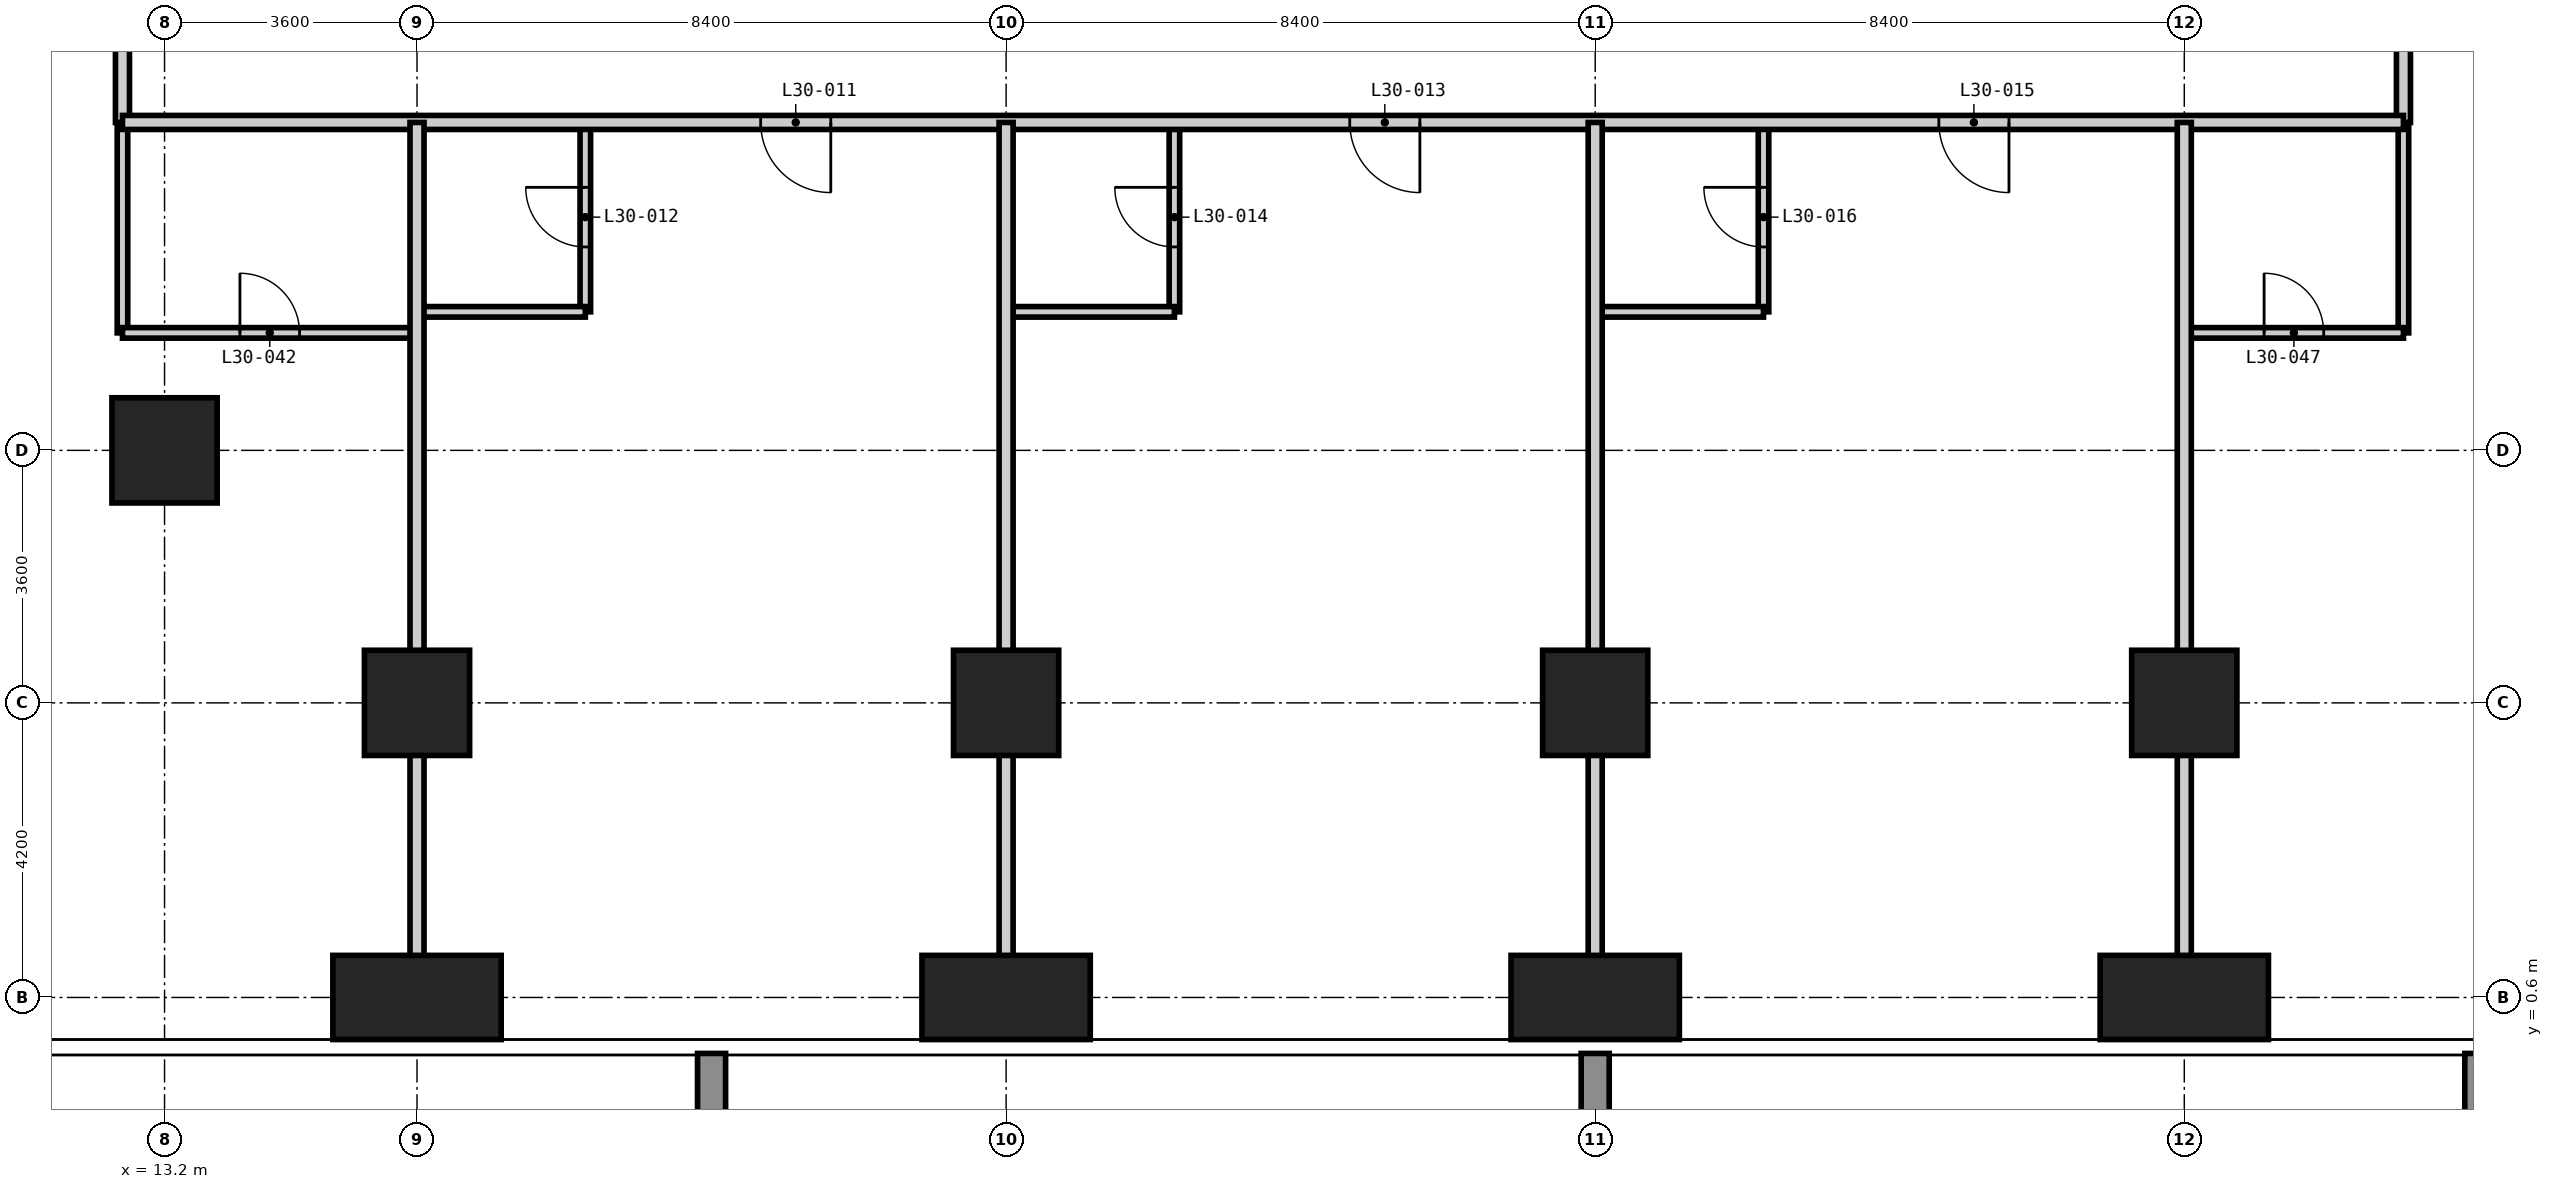
"""IFC4 building model, lengths in metres.
Left out: names, types, materials, properties, quantities, classifications, styles, units other than length and angle.
Written with IfcOpenShell. Run it as: python <this file> out.ifc"""

import sys

from ifc_helpers import new_model, si_unit, direction, frame, frame_2d, origin, origin_2d, place, context, subcontext, project, spatial, rectangle, extrude, element, fill, save


model = new_model("IFC4")
c1 = context("Model", 3, precision=1e-05, world=origin(), true_north=direction((0.0, 1.0)))
c2 = subcontext(c1, "Body", "Model", "MODEL_VIEW")
j1 = project(units=[si_unit("LENGTHUNIT", "METRE"), si_unit("PLANEANGLEUNIT", "RADIAN")], contexts=[c1])
p1 = place(None, origin())
s1 = spatial("IfcSite", under=j1, at=p1, CompositionType="ELEMENT")
p2 = place(p1, origin())
s2 = spatial("IfcBuilding", under=s1, at=p2, CompositionType="ELEMENT")
p3 = place(p2, frame((0.0, 0.0, 118.8)))
s3 = spatial("IfcBuildingStorey", under=s2, at=p3, CompositionType="ELEMENT", Elevation=118.8)
p4 = place(p3, frame((13.2, 8.4, -0.35), z_axis=(0.0, 0.0, 1.0), x_axis=(1.0, 0.0, 0.0)))
e1 = element("IfcColumn", 1, at=p4, inside=s3, PredefinedType="COLUMN", context=c2, shape_type="SweptSolid", body=[
    extrude(rectangle(XDim=1.5, YDim=1.5, at=origin_2d()), origin(), (0.0, 0.0, 1.0), 3.6),
])
p5 = place(p3, frame((16.8, 0.6, -0.35), z_axis=(0.0, 0.0, 1.0), x_axis=(1.0, 0.0, 0.0)))
e2 = element("IfcColumn", 2, at=p5, inside=s3, PredefinedType="COLUMN", context=c2, shape_type="SweptSolid", body=[
    extrude(rectangle(XDim=2.4, YDim=1.2, at=origin_2d()), origin(), (0.0, 0.0, 1.0), 3.6),
])
p6 = place(p3, frame((16.8, 4.8, -0.35), z_axis=(0.0, 0.0, 1.0), x_axis=(1.0, 0.0, 0.0)))
e3 = element("IfcColumn", 3, at=p6, inside=s3, PredefinedType="COLUMN", context=c2, shape_type="SweptSolid", body=[
    extrude(rectangle(XDim=1.5, YDim=1.5, at=origin_2d()), origin(), (0.0, 0.0, 1.0), 3.6),
])
p7 = place(p3, frame((25.2, 0.6, -0.35), z_axis=(0.0, 0.0, 1.0), x_axis=(1.0, 0.0, 0.0)))
e4 = element("IfcColumn", 4, at=p7, inside=s3, PredefinedType="COLUMN", context=c2, shape_type="SweptSolid", body=[
    extrude(rectangle(XDim=2.4, YDim=1.2, at=origin_2d()), origin(), (0.0, 0.0, 1.0), 3.6),
])
p8 = place(p3, frame((25.2, 4.8, -0.35), z_axis=(0.0, 0.0, 1.0), x_axis=(1.0, 0.0, 0.0)))
e5 = element("IfcColumn", 5, at=p8, inside=s3, PredefinedType="COLUMN", context=c2, shape_type="SweptSolid", body=[
    extrude(rectangle(XDim=1.5, YDim=1.5, at=origin_2d()), origin(), (0.0, 0.0, 1.0), 3.6),
])
p9 = place(p3, frame((33.6, 0.6, -0.35), z_axis=(0.0, 0.0, 1.0), x_axis=(1.0, 0.0, 0.0)))
e6 = element("IfcColumn", 6, at=p9, inside=s3, PredefinedType="COLUMN", context=c2, shape_type="SweptSolid", body=[
    extrude(rectangle(XDim=2.4, YDim=1.2, at=origin_2d()), origin(), (0.0, 0.0, 1.0), 3.6),
])
p10 = place(p3, frame((33.6, 4.8, -0.35), z_axis=(0.0, 0.0, 1.0), x_axis=(1.0, 0.0, 0.0)))
e7 = element("IfcColumn", 7, at=p10, inside=s3, PredefinedType="COLUMN", context=c2, shape_type="SweptSolid", body=[
    extrude(rectangle(XDim=1.5, YDim=1.5, at=origin_2d()), origin(), (0.0, 0.0, 1.0), 3.6),
])
p11 = place(p3, frame((42.0, 0.6, -0.35), z_axis=(0.0, 0.0, 1.0), x_axis=(1.0, 0.0, 0.0)))
e8 = element("IfcColumn", 8, at=p11, inside=s3, PredefinedType="COLUMN", context=c2, shape_type="SweptSolid", body=[
    extrude(rectangle(XDim=2.4, YDim=1.2, at=origin_2d()), origin(), (0.0, 0.0, 1.0), 3.6),
])
p12 = place(p3, frame((42.0, 4.8, -0.35), z_axis=(0.0, 0.0, 1.0), x_axis=(1.0, 0.0, 0.0)))
e9 = element("IfcColumn", 9, at=p12, inside=s3, PredefinedType="COLUMN", context=c2, shape_type="SweptSolid", body=[
    extrude(rectangle(XDim=1.5, YDim=1.5, at=origin_2d()), origin(), (0.0, 0.0, 1.0), 3.6),
])
p13 = place(p3, frame((12.6, 10.075, 0.0), z_axis=(0.0, 0.0, 1.0), x_axis=(0.0, 1.0, 0.0)))
e10 = element("IfcWall", 10, at=p13, inside=s3, PredefinedType="PARTITIONING", context=c2, shape_type="SweptSolid", body=[
    extrude(rectangle(XDim=3.0, YDim=0.15, at=frame_2d((1.5, 0.0))), origin(), (0.0, 0.0, 1.0), 3.25),
])
p14 = place(p3, frame((19.2, 10.375, 0.0), z_axis=(0.0, 0.0, 1.0), x_axis=(0.0, 1.0, 0.0)))
e11 = element("IfcWall", 11, at=p14, inside=s3, PredefinedType="PARTITIONING", context=c2, shape_type="SweptSolid", body=[
    extrude(rectangle(XDim=2.7, YDim=0.15, at=frame_2d((1.35, 0.0))), origin(), (0.0, 0.0, 1.0), 3.25),
])
p15 = place(p14, frame((0.925, 0.0, 0.0)))
e12 = element("IfcOpeningElement", 12, at=p15, cuts=e11, PredefinedType="OPENING", context=c2, shape_type="SweptSolid", body=[
    extrude(rectangle(XDim=0.85, YDim=2.1, at=frame_2d((0.425, 1.05))), frame((0.0, 0.085, 0.0), z_axis=(0.0, -1.0, 0.0), x_axis=(1.0, 0.0, 0.0)), (0.0, 0.0, 1.0), 0.17),
])
p16 = place(p3, frame((27.6, 10.375, 0.0), z_axis=(0.0, 0.0, 1.0), x_axis=(0.0, 1.0, 0.0)))
e13 = element("IfcWall", 13, at=p16, inside=s3, PredefinedType="PARTITIONING", context=c2, shape_type="SweptSolid", body=[
    extrude(rectangle(XDim=2.7, YDim=0.15, at=frame_2d((1.35, 0.0))), origin(), (0.0, 0.0, 1.0), 3.25),
])
p17 = place(p16, frame((0.925, 0.0, 0.0)))
e14 = element("IfcOpeningElement", 14, at=p17, cuts=e13, PredefinedType="OPENING", context=c2, shape_type="SweptSolid", body=[
    extrude(rectangle(XDim=0.85, YDim=2.1, at=frame_2d((0.425, 1.05))), frame((0.0, 0.085, 0.0), z_axis=(0.0, -1.0, 0.0), x_axis=(1.0, 0.0, 0.0)), (0.0, 0.0, 1.0), 0.17),
])
p18 = place(p3, frame((36.0, 10.375, 0.0), z_axis=(0.0, 0.0, 1.0), x_axis=(0.0, 1.0, 0.0)))
e15 = element("IfcWall", 15, at=p18, inside=s3, PredefinedType="PARTITIONING", context=c2, shape_type="SweptSolid", body=[
    extrude(rectangle(XDim=2.7, YDim=0.15, at=frame_2d((1.35, 0.0))), origin(), (0.0, 0.0, 1.0), 3.25),
])
p19 = place(p18, frame((0.925, 0.0, 0.0)))
e16 = element("IfcOpeningElement", 16, at=p19, cuts=e15, PredefinedType="OPENING", context=c2, shape_type="SweptSolid", body=[
    extrude(rectangle(XDim=0.85, YDim=2.1, at=frame_2d((0.425, 1.05))), frame((0.0, 0.085, 0.0), z_axis=(0.0, -1.0, 0.0), x_axis=(1.0, 0.0, 0.0)), (0.0, 0.0, 1.0), 0.17),
])
p20 = place(p3, frame((45.125, 10.075, 0.0), z_axis=(0.0, 0.0, 1.0), x_axis=(0.0, 1.0, 0.0)))
e17 = element("IfcWall", 17, at=p20, inside=s3, PredefinedType="PARTITIONING", context=c2, shape_type="SweptSolid", body=[
    extrude(rectangle(XDim=3.0, YDim=0.15, at=frame_2d((1.5, 0.0))), origin(), (0.0, 0.0, 1.0), 3.25),
])
p21 = place(p3, frame((12.6, 10.075, 0.0), z_axis=(0.0, 0.0, 1.0), x_axis=(1.0, 0.0, 0.0)))
e18 = element("IfcWall", 18, at=p21, inside=s3, PredefinedType="PARTITIONING", context=c2, shape_type="SweptSolid", body=[
    extrude(rectangle(XDim=4.2, YDim=0.15, at=frame_2d((2.1, 0.0))), origin(), (0.0, 0.0, 1.0), 3.25),
])
p22 = place(p21, frame((1.675, 0.0, 0.0)))
e19 = element("IfcOpeningElement", 19, at=p22, cuts=e18, PredefinedType="OPENING", context=c2, shape_type="SweptSolid", body=[
    extrude(rectangle(XDim=0.85, YDim=2.1, at=frame_2d((0.425, 1.05))), frame((0.0, 0.085, 0.0), z_axis=(0.0, -1.0, 0.0), x_axis=(1.0, 0.0, 0.0)), (0.0, 0.0, 1.0), 0.17),
])
p23 = place(p3, frame((42.0, 10.075, 0.0), z_axis=(0.0, 0.0, 1.0), x_axis=(1.0, 0.0, 0.0)))
e20 = element("IfcWall", 20, at=p23, inside=s3, PredefinedType="PARTITIONING", context=c2, shape_type="SweptSolid", body=[
    extrude(rectangle(XDim=3.125, YDim=0.15, at=frame_2d((1.562, 0.0))), origin(), (0.0, 0.0, 1.0), 3.25),
])
p24 = place(p23, frame((1.138, 0.0, 0.0)))
e21 = element("IfcOpeningElement", 21, at=p24, cuts=e20, PredefinedType="OPENING", context=c2, shape_type="SweptSolid", body=[
    extrude(rectangle(XDim=0.85, YDim=2.1, at=frame_2d((0.425, 1.05))), frame((0.0, 0.085, 0.0), z_axis=(0.0, -1.0, 0.0), x_axis=(1.0, 0.0, 0.0)), (0.0, 0.0, 1.0), 0.17),
])
p25 = place(p3, frame((16.8, 10.375, 0.0), z_axis=(0.0, 0.0, 1.0), x_axis=(1.0, 0.0, 0.0)))
e22 = element("IfcWall", 22, at=p25, inside=s3, PredefinedType="PARTITIONING", context=c2, shape_type="SweptSolid", body=[
    extrude(rectangle(XDim=2.4, YDim=0.15, at=frame_2d((1.2, 0.0))), origin(), (0.0, 0.0, 1.0), 3.25),
])
p26 = place(p3, frame((25.2, 10.375, 0.0), z_axis=(0.0, 0.0, 1.0), x_axis=(1.0, 0.0, 0.0)))
e23 = element("IfcWall", 23, at=p26, inside=s3, PredefinedType="PARTITIONING", context=c2, shape_type="SweptSolid", body=[
    extrude(rectangle(XDim=2.4, YDim=0.15, at=frame_2d((1.2, 0.0))), origin(), (0.0, 0.0, 1.0), 3.25),
])
p27 = place(p3, frame((33.6, 10.375, 0.0), z_axis=(0.0, 0.0, 1.0), x_axis=(1.0, 0.0, 0.0)))
e24 = element("IfcWall", 24, at=p27, inside=s3, PredefinedType="PARTITIONING", context=c2, shape_type="SweptSolid", body=[
    extrude(rectangle(XDim=2.4, YDim=0.15, at=frame_2d((1.2, 0.0))), origin(), (0.0, 0.0, 1.0), 3.25),
])
p28 = place(p3, frame((12.6, 13.075, 0.0), z_axis=(0.0, 0.0, 1.0), x_axis=(0.0, 1.0, 0.0)))
e25 = element("IfcWall", 25, at=p28, inside=s3, PredefinedType="PARTITIONING", context=c2, shape_type="SweptSolid", body=[
    extrude(rectangle(XDim=31.45, YDim=0.2, at=frame_2d((15.725, 0.0))), origin(), (0.0, 0.0, 1.0), 3.25),
])
p29 = place(p28, frame((8.625, 0.0, 0.0)))
e26 = element("IfcOpeningElement", 26, at=p29, cuts=e25, PredefinedType="OPENING", context=c2, shape_type="SweptSolid", body=[
    extrude(rectangle(XDim=1.0, YDim=2.2, at=frame_2d((0.5, 1.1))), frame((0.0, 0.11, 0.0), z_axis=(0.0, -1.0, 0.0), x_axis=(1.0, 0.0, 0.0)), (0.0, 0.0, 1.0), 0.22),
])
p30 = place(p28, frame((17.025, 0.0, 0.0)))
e27 = element("IfcOpeningElement", 27, at=p30, cuts=e25, PredefinedType="OPENING", context=c2, shape_type="SweptSolid", body=[
    extrude(rectangle(XDim=1.0, YDim=2.2, at=frame_2d((0.5, 1.1))), frame((0.0, 0.11, 0.0), z_axis=(0.0, -1.0, 0.0), x_axis=(1.0, 0.0, 0.0)), (0.0, 0.0, 1.0), 0.22),
])
p31 = place(p28, frame((25.425, 0.0, 0.0)))
e28 = element("IfcOpeningElement", 28, at=p31, cuts=e25, PredefinedType="OPENING", context=c2, shape_type="SweptSolid", body=[
    extrude(rectangle(XDim=1.0, YDim=2.2, at=frame_2d((0.5, 1.1))), frame((0.0, 0.11, 0.0), z_axis=(0.0, -1.0, 0.0), x_axis=(1.0, 0.0, 0.0)), (0.0, 0.0, 1.0), 0.22),
])
p32 = place(p28, frame((1.363, 0.0, 0.0)))
e29 = element("IfcOpeningElement", 29, at=p32, cuts=e25, PredefinedType="OPENING", context=c2, shape_type="SweptSolid", body=[
    extrude(rectangle(XDim=1.0, YDim=2.2, at=frame_2d((0.5, 1.1))), frame((0.0, 0.11, 0.0), z_axis=(0.0, -1.0, 0.0), x_axis=(1.0, 0.0, 0.0)), (0.0, 0.0, 1.0), 0.22),
])
p33 = place(p28, frame((29.788, 0.0, 0.0)))
e30 = element("IfcOpeningElement", 30, at=p33, cuts=e25, PredefinedType="OPENING", context=c2, shape_type="SweptSolid", body=[
    extrude(rectangle(XDim=1.0, YDim=2.2, at=frame_2d((0.5, 1.1))), frame((0.0, 0.11, 0.0), z_axis=(0.0, -1.0, 0.0), x_axis=(1.0, 0.0, 0.0)), (0.0, 0.0, 1.0), 0.22),
])
p34 = place(p3, frame((45.125, 44.525, 0.0), z_axis=(0.0, 0.0, 1.0), x_axis=(0.0, -1.0, 0.0)))
e31 = element("IfcWall", 31, at=p34, inside=s3, PredefinedType="PARTITIONING", context=c2, shape_type="SweptSolid", body=[
    extrude(rectangle(XDim=31.45, YDim=0.2, at=frame_2d((15.725, 0.0))), origin(), (0.0, 0.0, 1.0), 3.25),
])
p35 = place(p34, frame((24.225, 0.0, 0.0)))
e32 = element("IfcOpeningElement", 32, at=p35, cuts=e31, PredefinedType="OPENING", context=c2, shape_type="SweptSolid", body=[
    extrude(rectangle(XDim=1.0, YDim=2.2, at=frame_2d((0.5, 1.1))), frame((0.0, 0.11, 0.0), z_axis=(0.0, -1.0, 0.0), x_axis=(1.0, 0.0, 0.0)), (0.0, 0.0, 1.0), 0.22),
])
p36 = place(p34, frame((15.825, 0.0, 0.0)))
e33 = element("IfcOpeningElement", 33, at=p36, cuts=e31, PredefinedType="OPENING", context=c2, shape_type="SweptSolid", body=[
    extrude(rectangle(XDim=1.0, YDim=2.2, at=frame_2d((0.5, 1.1))), frame((0.0, 0.11, 0.0), z_axis=(0.0, -1.0, 0.0), x_axis=(1.0, 0.0, 0.0)), (0.0, 0.0, 1.0), 0.22),
])
p37 = place(p34, frame((7.425, 0.0, 0.0)))
e34 = element("IfcOpeningElement", 34, at=p37, cuts=e31, PredefinedType="OPENING", context=c2, shape_type="SweptSolid", body=[
    extrude(rectangle(XDim=1.0, YDim=2.2, at=frame_2d((0.5, 1.1))), frame((0.0, 0.11, 0.0), z_axis=(0.0, -1.0, 0.0), x_axis=(1.0, 0.0, 0.0)), (0.0, 0.0, 1.0), 0.22),
])
p38 = place(p34, frame((29.087, 0.0, 0.0)))
e35 = element("IfcOpeningElement", 35, at=p38, cuts=e31, PredefinedType="OPENING", context=c2, shape_type="SweptSolid", body=[
    extrude(rectangle(XDim=1.0, YDim=2.2, at=frame_2d((0.5, 1.1))), frame((0.0, 0.11, 0.0), z_axis=(0.0, -1.0, 0.0), x_axis=(1.0, 0.0, 0.0)), (0.0, 0.0, 1.0), 0.22),
])
p39 = place(p34, frame((0.762, 0.0, 0.0)))
e36 = element("IfcOpeningElement", 36, at=p39, cuts=e31, PredefinedType="OPENING", context=c2, shape_type="SweptSolid", body=[
    extrude(rectangle(XDim=1.0, YDim=2.2, at=frame_2d((0.5, 1.1))), frame((0.0, 0.11, 0.0), z_axis=(0.0, -1.0, 0.0), x_axis=(1.0, 0.0, 0.0)), (0.0, 0.0, 1.0), 0.22),
])
p40 = place(p3, frame((45.125, 13.075, 0.0), z_axis=(0.0, 0.0, 1.0), x_axis=(-1.0, 0.0, 0.0)))
e37 = element("IfcWall", 37, at=p40, inside=s3, PredefinedType="PARTITIONING", context=c2, shape_type="SweptSolid", body=[
    extrude(rectangle(XDim=32.525, YDim=0.2, at=frame_2d((16.262, 0.0))), origin(), (0.0, 0.0, 1.0), 3.25),
])
p41 = place(p40, frame((22.425, 0.0, 0.0)))
e38 = element("IfcOpeningElement", 38, at=p41, cuts=e37, PredefinedType="OPENING", context=c2, shape_type="SweptSolid", body=[
    extrude(rectangle(XDim=1.0, YDim=2.2, at=frame_2d((0.5, 1.1))), frame((0.0, 0.11, 0.0), z_axis=(0.0, -1.0, 0.0), x_axis=(1.0, 0.0, 0.0)), (0.0, 0.0, 1.0), 0.22),
])
p42 = place(p40, frame((14.025, 0.0, 0.0)))
e39 = element("IfcOpeningElement", 39, at=p42, cuts=e37, PredefinedType="OPENING", context=c2, shape_type="SweptSolid", body=[
    extrude(rectangle(XDim=1.0, YDim=2.2, at=frame_2d((0.5, 1.1))), frame((0.0, 0.11, 0.0), z_axis=(0.0, -1.0, 0.0), x_axis=(1.0, 0.0, 0.0)), (0.0, 0.0, 1.0), 0.22),
])
p43 = place(p40, frame((5.625, 0.0, 0.0)))
e40 = element("IfcOpeningElement", 40, at=p43, cuts=e37, PredefinedType="OPENING", context=c2, shape_type="SweptSolid", body=[
    extrude(rectangle(XDim=1.0, YDim=2.2, at=frame_2d((0.5, 1.1))), frame((0.0, 0.11, 0.0), z_axis=(0.0, -1.0, 0.0), x_axis=(1.0, 0.0, 0.0)), (0.0, 0.0, 1.0), 0.22),
])
for number, where, z_axis, x_axis in (
    (41, (16.8, -0.018, 0.0), (0.0, 0.0, 1.0), (0.0, 1.0, 0.0)),
    (42, (25.2, -0.018, 0.0), (0.0, 0.0, 1.0), (0.0, 1.0, 0.0)),
    (43, (33.6, -0.018, 0.0), (0.0, 0.0, 1.0), (0.0, 1.0, 0.0)),
    (44, (42.0, -0.018, 0.0), (0.0, 0.0, 1.0), (0.0, 1.0, 0.0)),
):
    element("IfcWall", number, at=place(p3, frame(where, z_axis=z_axis, x_axis=x_axis)), inside=s3, PredefinedType="PARTITIONING", context=c2, shape_type="SweptSolid", body=[
        extrude(rectangle(XDim=13.093, YDim=0.2, at=frame_2d((6.546, 0.0))), origin(), (0.0, 0.0, 1.0), 3.25),
    ])
p44 = place(p41, origin())
e45 = element("IfcDoor", 45, at=p44, inside=s3, OperationType="SINGLE_SWING_LEFT", PredefinedType="DOOR", context=c2, shape_type="SweptSolid", body=[
    extrude(rectangle(XDim=1.0, YDim=2.2, at=frame_2d((0.5, 1.1))), frame((0.0, 0.025, 0.0), z_axis=(0.0, -1.0, 0.0), x_axis=(1.0, 0.0, 0.0)), (0.0, 0.0, 1.0), 0.05),
])
fill(e38, e45)
p45 = place(p15, origin())
e46 = element("IfcDoor", 46, at=p45, inside=s3, OperationType="SINGLE_SWING_RIGHT", PredefinedType="DOOR", context=c2, shape_type="SweptSolid", body=[
    extrude(rectangle(XDim=0.85, YDim=2.1, at=frame_2d((0.425, 1.05))), frame((0.0, 0.025, 0.0), z_axis=(0.0, -1.0, 0.0), x_axis=(1.0, 0.0, 0.0)), (0.0, 0.0, 1.0), 0.05),
])
fill(e12, e46)
p46 = place(p42, origin())
e47 = element("IfcDoor", 47, at=p46, inside=s3, OperationType="SINGLE_SWING_LEFT", PredefinedType="DOOR", context=c2, shape_type="SweptSolid", body=[
    extrude(rectangle(XDim=1.0, YDim=2.2, at=frame_2d((0.5, 1.1))), frame((0.0, 0.025, 0.0), z_axis=(0.0, -1.0, 0.0), x_axis=(1.0, 0.0, 0.0)), (0.0, 0.0, 1.0), 0.05),
])
fill(e39, e47)
p47 = place(p17, origin())
e48 = element("IfcDoor", 48, at=p47, inside=s3, OperationType="SINGLE_SWING_RIGHT", PredefinedType="DOOR", context=c2, shape_type="SweptSolid", body=[
    extrude(rectangle(XDim=0.85, YDim=2.1, at=frame_2d((0.425, 1.05))), frame((0.0, 0.025, 0.0), z_axis=(0.0, -1.0, 0.0), x_axis=(1.0, 0.0, 0.0)), (0.0, 0.0, 1.0), 0.05),
])
fill(e14, e48)
p48 = place(p43, origin())
e49 = element("IfcDoor", 49, at=p48, inside=s3, OperationType="SINGLE_SWING_LEFT", PredefinedType="DOOR", context=c2, shape_type="SweptSolid", body=[
    extrude(rectangle(XDim=1.0, YDim=2.2, at=frame_2d((0.5, 1.1))), frame((0.0, 0.025, 0.0), z_axis=(0.0, -1.0, 0.0), x_axis=(1.0, 0.0, 0.0)), (0.0, 0.0, 1.0), 0.05),
])
fill(e40, e49)
p49 = place(p19, origin())
e50 = element("IfcDoor", 50, at=p49, inside=s3, OperationType="SINGLE_SWING_RIGHT", PredefinedType="DOOR", context=c2, shape_type="SweptSolid", body=[
    extrude(rectangle(XDim=0.85, YDim=2.1, at=frame_2d((0.425, 1.05))), frame((0.0, 0.025, 0.0), z_axis=(0.0, -1.0, 0.0), x_axis=(1.0, 0.0, 0.0)), (0.0, 0.0, 1.0), 0.05),
])
fill(e16, e50)
p50 = place(p22, origin())
e51 = element("IfcDoor", 51, at=p50, inside=s3, OperationType="SINGLE_SWING_LEFT", PredefinedType="DOOR", context=c2, shape_type="SweptSolid", body=[
    extrude(rectangle(XDim=0.85, YDim=2.1, at=frame_2d((0.425, 1.05))), frame((0.0, 0.025, 0.0), z_axis=(0.0, -1.0, 0.0), x_axis=(1.0, 0.0, 0.0)), (0.0, 0.0, 1.0), 0.05),
])
fill(e19, e51)
p51 = place(p24, origin())
e52 = element("IfcDoor", 52, at=p51, inside=s3, OperationType="SINGLE_SWING_LEFT", PredefinedType="DOOR", context=c2, shape_type="SweptSolid", body=[
    extrude(rectangle(XDim=0.85, YDim=2.1, at=frame_2d((0.425, 1.05))), frame((0.0, 0.025, 0.0), z_axis=(0.0, -1.0, 0.0), x_axis=(1.0, 0.0, 0.0)), (0.0, 0.0, 1.0), 0.05),
])
fill(e21, e52)
save(model, sys.argv[1])
